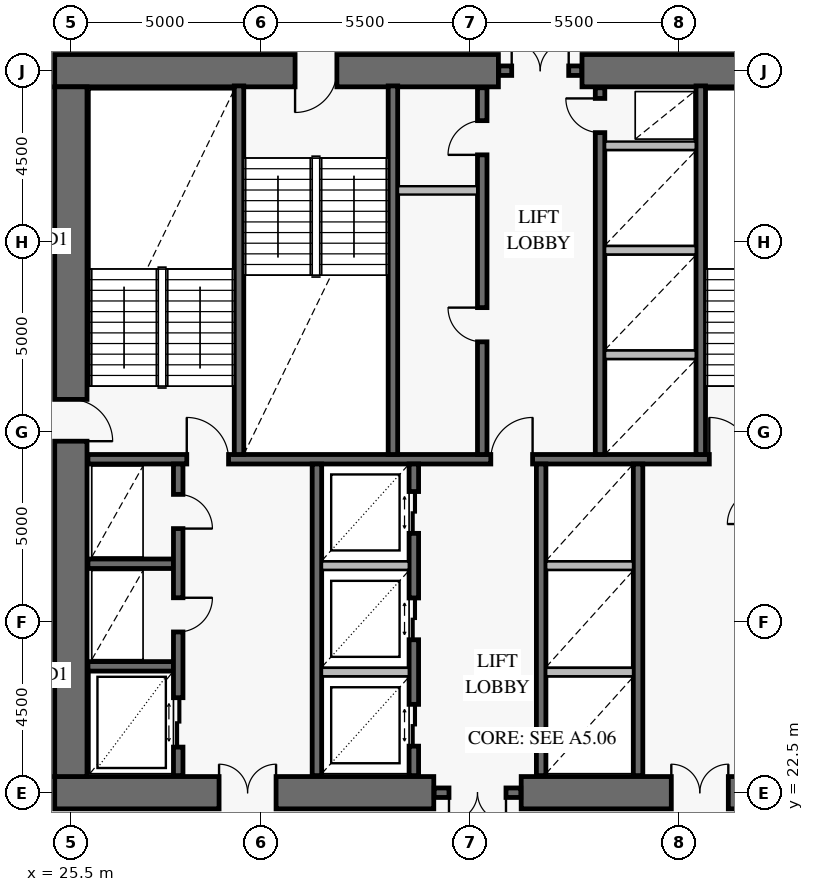
"""IFC4 building model, lengths in metres.
Left out: names, types, materials, properties, quantities, classifications, styles, units other than length and angle.
Written with IfcOpenShell. Run it as: python <this file> out.ifc"""

import sys

from ifc_helpers import new_model, si_unit, direction, frame, frame_2d, origin, place, context, subcontext, project, spatial, rectangle, extrude, element, fill, save


model = new_model("IFC4")
c1 = context("Model", 3, precision=1e-05, world=origin(), true_north=direction((0.0, 1.0)))
c2 = subcontext(c1, "Body", "Model", "MODEL_VIEW")
j1 = project(units=[si_unit("LENGTHUNIT", "METRE"), si_unit("PLANEANGLEUNIT", "RADIAN")], contexts=[c1])
p1 = place(None, origin())
s1 = spatial("IfcSite", under=j1, at=p1, CompositionType="ELEMENT")
p2 = place(p1, origin())
s2 = spatial("IfcBuilding", under=s1, at=p2, CompositionType="ELEMENT")
p3 = place(p2, frame((0.0, 0.0, 37.2)))
s3 = spatial("IfcBuildingStorey", under=s2, at=p3, CompositionType="ELEMENT", Elevation=37.2)
p4 = place(p3, frame((25.075, 22.5, 0.0), z_axis=(0.0, 0.0, 1.0), x_axis=(1.0, 0.0, 0.0)))
e1 = element("IfcWall", 1, at=p4, inside=s3, PredefinedType="SHEAR", context=c2, shape_type="SweptSolid", body=[
    extrude(rectangle(XDim=9.975, YDim=0.85, at=frame_2d((4.988, 0.0))), origin(), (0.0, 0.0, 1.0), 4.2),
])
p5 = place(p4, frame((4.325, 0.0, 0.0)))
e2 = element("IfcOpeningElement", 2, at=p5, cuts=e1, PredefinedType="OPENING", context=c2, shape_type="SweptSolid", body=[
    extrude(rectangle(XDim=1.5, YDim=2.15, at=frame_2d((0.75, 1.075))), frame((0.0, 0.437, 0.0), z_axis=(0.0, -1.0, 0.0), x_axis=(1.0, 0.0, 0.0)), (0.0, 0.0, 1.0), 0.874),
])
p6 = place(p3, frame((37.35, 22.5, 0.0), z_axis=(0.0, 0.0, 1.0), x_axis=(1.0, 0.0, 0.0)))
e3 = element("IfcWall", 3, at=p6, inside=s3, PredefinedType="SHEAR", context=c2, shape_type="SweptSolid", body=[
    extrude(rectangle(XDim=9.575, YDim=0.85, at=frame_2d((4.788, 0.0))), origin(), (0.0, 0.0, 1.0), 4.2),
])
p7 = place(p6, frame((3.95, 0.0, 0.0)))
e4 = element("IfcOpeningElement", 4, at=p7, cuts=e3, PredefinedType="OPENING", context=c2, shape_type="SweptSolid", body=[
    extrude(rectangle(XDim=1.5, YDim=2.15, at=frame_2d((0.75, 1.075))), frame((0.0, 0.437, 0.0), z_axis=(0.0, -1.0, 0.0), x_axis=(1.0, 0.0, 0.0)), (0.0, 0.0, 1.0), 0.874),
])
p8 = place(p3, frame((46.925, 41.5, 0.0), z_axis=(0.0, 0.0, 1.0), x_axis=(-1.0, 0.0, 0.0)))
e5 = element("IfcWall", 5, at=p8, inside=s3, PredefinedType="SHEAR", context=c2, shape_type="SweptSolid", body=[
    extrude(rectangle(XDim=7.975, YDim=0.85, at=frame_2d((3.988, 0.0))), origin(), (0.0, 0.0, 1.0), 4.2),
])
p9 = place(p3, frame((36.75, 41.5, 0.0), z_axis=(0.0, 0.0, 1.0), x_axis=(-1.0, 0.0, 0.0)))
e6 = element("IfcWall", 6, at=p9, inside=s3, PredefinedType="SHEAR", context=c2, shape_type="SweptSolid", body=[
    extrude(rectangle(XDim=11.675, YDim=0.85, at=frame_2d((5.837, 0.0))), origin(), (0.0, 0.0, 1.0), 4.2),
])
p10 = place(p9, frame((4.25, 0.0, 0.0)))
e7 = element("IfcOpeningElement", 7, at=p10, cuts=e6, PredefinedType="OPENING", context=c2, shape_type="SweptSolid", body=[
    extrude(rectangle(XDim=1.1, YDim=2.15, at=frame_2d((0.55, 1.075))), frame((0.0, 0.437, 0.0), z_axis=(0.0, -1.0, 0.0), x_axis=(1.0, 0.0, 0.0)), (0.0, 0.0, 1.0), 0.874),
])
p11 = place(p3, frame((25.5, 22.925, 0.0), z_axis=(0.0, 0.0, 1.0), x_axis=(0.0, 1.0, 0.0)))
e8 = element("IfcWall", 8, at=p11, inside=s3, PredefinedType="SHEAR", context=c2, shape_type="SweptSolid", body=[
    extrude(rectangle(XDim=18.15, YDim=0.85, at=frame_2d((9.075, 0.0))), origin(), (0.0, 0.0, 1.0), 4.2),
])
p12 = place(p11, frame((8.825, 0.0, 0.0)))
e9 = element("IfcOpeningElement", 9, at=p12, cuts=e8, PredefinedType="OPENING", context=c2, shape_type="SweptSolid", body=[
    extrude(rectangle(XDim=1.1, YDim=2.15, at=frame_2d((0.55, 1.075))), frame((0.0, 0.437, 0.0), z_axis=(0.0, -1.0, 0.0), x_axis=(1.0, 0.0, 0.0)), (0.0, 0.0, 1.0), 0.874),
])
p13 = place(p3, frame((35.06, 22.5, 0.0), z_axis=(0.0, 0.0, 1.0), x_axis=(1.0, 0.0, 0.0)))
e10 = element("IfcWall", 10, at=p13, inside=s3, PredefinedType="SOLIDWALL", context=c2, shape_type="SweptSolid", body=[
    extrude(rectangle(XDim=2.28, YDim=0.25, at=frame_2d((1.14, 0.0))), origin(), (0.0, 0.0, 1.0), 4.2),
])
p14 = place(p13, frame((0.39, 0.0, 0.0)))
e11 = element("IfcOpeningElement", 11, at=p14, cuts=e10, PredefinedType="OPENING", context=c2, shape_type="SweptSolid", body=[
    extrude(rectangle(XDim=1.5, YDim=2.15, at=frame_2d((0.75, 1.075))), frame((0.0, 0.137, 0.0), z_axis=(0.0, -1.0, 0.0), x_axis=(1.0, 0.0, 0.0)), (0.0, 0.0, 1.0), 0.274),
])
p15 = place(p3, frame((36.76, 41.5, 0.0), z_axis=(0.0, 0.0, 1.0), x_axis=(1.0, 0.0, 0.0)))
e12 = element("IfcWall", 12, at=p15, inside=s3, PredefinedType="SOLIDWALL", context=c2, shape_type="SweptSolid", body=[
    extrude(rectangle(XDim=2.18, YDim=0.25, at=frame_2d((1.09, 0.0))), origin(), (0.0, 0.0, 1.0), 4.2),
])
p16 = place(p15, frame((0.34, 0.0, 0.0)))
e13 = element("IfcOpeningElement", 13, at=p16, cuts=e12, PredefinedType="OPENING", context=c2, shape_type="SweptSolid", body=[
    extrude(rectangle(XDim=1.5, YDim=2.15, at=frame_2d((0.75, 1.075))), frame((0.0, 0.137, 0.0), z_axis=(0.0, -1.0, 0.0), x_axis=(1.0, 0.0, 0.0)), (0.0, 0.0, 1.0), 0.274),
])
p17 = place(p3, frame((25.95, 31.275, 0.0), z_axis=(0.0, 0.0, 1.0), x_axis=(1.0, 0.0, 0.0)))
e14 = element("IfcWall", 14, at=p17, inside=s3, PredefinedType="SOLIDWALL", context=c2, shape_type="SweptSolid", body=[
    extrude(rectangle(XDim=20.1, YDim=0.25, at=frame_2d((10.05, 0.0))), origin(), (0.0, 0.0, 1.0), 4.2),
])
p18 = place(p17, frame((2.6, 0.0, 0.0)))
e15 = element("IfcOpeningElement", 15, at=p18, cuts=e14, PredefinedType="OPENING", context=c2, shape_type="SweptSolid", body=[
    extrude(rectangle(XDim=1.1, YDim=2.15, at=frame_2d((0.55, 1.075))), frame((0.0, 0.137, 0.0), z_axis=(0.0, -1.0, 0.0), x_axis=(1.0, 0.0, 0.0)), (0.0, 0.0, 1.0), 0.274),
])
p19 = place(p17, frame((10.6, 0.0, 0.0)))
e16 = element("IfcOpeningElement", 16, at=p19, cuts=e14, PredefinedType="OPENING", context=c2, shape_type="SweptSolid", body=[
    extrude(rectangle(XDim=1.1, YDim=2.15, at=frame_2d((0.55, 1.075))), frame((0.0, 0.137, 0.0), z_axis=(0.0, -1.0, 0.0), x_axis=(1.0, 0.0, 0.0)), (0.0, 0.0, 1.0), 0.274),
])
p20 = place(p17, frame((16.35, 0.0, 0.0)))
e17 = element("IfcOpeningElement", 17, at=p20, cuts=e14, PredefinedType="OPENING", context=c2, shape_type="SweptSolid", body=[
    extrude(rectangle(XDim=1.1, YDim=2.15, at=frame_2d((0.55, 1.075))), frame((0.0, 0.137, 0.0), z_axis=(0.0, -1.0, 0.0), x_axis=(1.0, 0.0, 0.0)), (0.0, 0.0, 1.0), 0.274),
])
for number, where, z_axis, x_axis in (
    (18, (29.925, 31.4, 0.0), (0.0, 0.0, 1.0), (0.0, 1.0, 0.0)),
    (19, (33.975, 31.4, 0.0), (0.0, 0.0, 1.0), (0.0, 1.0, 0.0)),
    (20, (42.075, 31.4, 0.0), (0.0, 0.0, 1.0), (0.0, 1.0, 0.0)),
):
    element("IfcWall", number, at=place(p3, frame(where, z_axis=z_axis, x_axis=x_axis)), inside=s3, PredefinedType="SOLIDWALL", context=c2, shape_type="SweptSolid", body=[
        extrude(rectangle(XDim=9.7, YDim=0.25, at=frame_2d((4.85, 0.0))), origin(), (0.0, 0.0, 1.0), 4.2),
    ])
p21 = place(p3, frame((36.325, 31.4, 0.0), z_axis=(0.0, 0.0, 1.0), x_axis=(0.0, 1.0, 0.0)))
e21 = element("IfcWall", 21, at=p21, inside=s3, PredefinedType="SOLIDWALL", context=c2, shape_type="SweptSolid", body=[
    extrude(rectangle(XDim=9.65, YDim=0.25, at=frame_2d((4.825, 0.0))), origin(), (0.0, 0.0, 1.0), 4.2),
])
p22 = place(p21, frame((2.965, 0.0, 0.0)))
e22 = element("IfcOpeningElement", 22, at=p22, cuts=e21, PredefinedType="OPENING", context=c2, shape_type="SweptSolid", body=[
    extrude(rectangle(XDim=0.9, YDim=2.1, at=frame_2d((0.45, 1.05))), frame((0.0, 0.137, 0.0), z_axis=(0.0, -1.0, 0.0), x_axis=(1.0, 0.0, 0.0)), (0.0, 0.0, 1.0), 0.274),
])
p23 = place(p21, frame((7.885, 0.0, 0.0)))
e23 = element("IfcOpeningElement", 23, at=p23, cuts=e21, PredefinedType="OPENING", context=c2, shape_type="SweptSolid", body=[
    extrude(rectangle(XDim=0.9, YDim=2.1, at=frame_2d((0.45, 1.05))), frame((0.0, 0.137, 0.0), z_axis=(0.0, -1.0, 0.0), x_axis=(1.0, 0.0, 0.0)), (0.0, 0.0, 1.0), 0.274),
])
p24 = place(p3, frame((39.425, 31.4, 0.0), z_axis=(0.0, 0.0, 1.0), x_axis=(0.0, 1.0, 0.0)))
e24 = element("IfcWall", 24, at=p24, inside=s3, PredefinedType="SOLIDWALL", context=c2, shape_type="SweptSolid", body=[
    extrude(rectangle(XDim=9.65, YDim=0.25, at=frame_2d((4.825, 0.0))), origin(), (0.0, 0.0, 1.0), 4.2),
])
p25 = place(p24, frame((8.47, 0.0, 0.0)))
e25 = element("IfcOpeningElement", 25, at=p25, cuts=e24, PredefinedType="OPENING", context=c2, shape_type="SweptSolid", body=[
    extrude(rectangle(XDim=0.9, YDim=2.1, at=frame_2d((0.45, 1.05))), frame((0.0, 0.137, 0.0), z_axis=(0.0, -1.0, 0.0), x_axis=(1.0, 0.0, 0.0)), (0.0, 0.0, 1.0), 0.274),
])
for number, where, z_axis, x_axis in (
    (26, (25.95, 25.825, 0.0), (0.0, 0.0, 1.0), (1.0, 0.0, 0.0)),
    (27, (25.95, 28.525, 0.0), (0.0, 0.0, 1.0), (1.0, 0.0, 0.0)),
):
    element("IfcWall", number, at=place(p3, frame(where, z_axis=z_axis, x_axis=x_axis)), inside=s3, PredefinedType="SOLIDWALL", context=c2, shape_type="SweptSolid", body=[
        extrude(rectangle(XDim=2.25, YDim=0.25, at=frame_2d((1.125, 0.0))), origin(), (0.0, 0.0, 1.0), 4.2),
    ])
p26 = place(p3, frame((28.325, 22.95, 0.0), z_axis=(0.0, 0.0, 1.0), x_axis=(0.0, 1.0, 0.0)))
e28 = element("IfcWall", 28, at=p26, inside=s3, PredefinedType="SOLIDWALL", context=c2, shape_type="SweptSolid", body=[
    extrude(rectangle(XDim=8.2, YDim=0.25, at=frame_2d((4.1, 0.0))), origin(), (0.0, 0.0, 1.0), 4.2),
])
p27 = place(p26, frame((0.75, 0.0, 0.0)))
e29 = element("IfcOpeningElement", 29, at=p27, cuts=e28, PredefinedType="OPENING", context=c2, shape_type="SweptSolid", body=[
    extrude(rectangle(XDim=1.3, YDim=2.3, at=frame_2d((0.65, 1.15))), frame((0.0, 0.137, 0.0), z_axis=(0.0, -1.0, 0.0), x_axis=(1.0, 0.0, 0.0)), (0.0, 0.0, 1.0), 0.274),
])
p28 = place(p26, frame((3.78, 0.0, 0.0)))
e30 = element("IfcOpeningElement", 30, at=p28, cuts=e28, PredefinedType="OPENING", context=c2, shape_type="SweptSolid", body=[
    extrude(rectangle(XDim=0.9, YDim=2.1, at=frame_2d((0.45, 1.05))), frame((0.0, 0.137, 0.0), z_axis=(0.0, -1.0, 0.0), x_axis=(1.0, 0.0, 0.0)), (0.0, 0.0, 1.0), 0.274),
])
p29 = place(p26, frame((6.5, 0.0, 0.0)))
e31 = element("IfcOpeningElement", 31, at=p29, cuts=e28, PredefinedType="OPENING", context=c2, shape_type="SweptSolid", body=[
    extrude(rectangle(XDim=0.9, YDim=2.1, at=frame_2d((0.45, 1.05))), frame((0.0, 0.137, 0.0), z_axis=(0.0, -1.0, 0.0), x_axis=(1.0, 0.0, 0.0)), (0.0, 0.0, 1.0), 0.274),
])
p30 = place(p3, frame((31.975, 22.95, 0.0), z_axis=(0.0, 0.0, 1.0), x_axis=(0.0, 1.0, 0.0)))
e32 = element("IfcWall", 32, at=p30, inside=s3, PredefinedType="SOLIDWALL", context=c2, shape_type="SweptSolid", body=[
    extrude(rectangle(XDim=8.2, YDim=0.25, at=frame_2d((4.1, 0.0))), origin(), (0.0, 0.0, 1.0), 4.2),
])
p31 = place(p3, frame((34.525, 22.95, 0.0), z_axis=(0.0, 0.0, 1.0), x_axis=(0.0, 1.0, 0.0)))
e33 = element("IfcWall", 33, at=p31, inside=s3, PredefinedType="SOLIDWALL", context=c2, shape_type="SweptSolid", body=[
    extrude(rectangle(XDim=8.2, YDim=0.25, at=frame_2d((4.1, 0.0))), origin(), (0.0, 0.0, 1.0), 4.2),
])
p32 = place(p31, frame((0.775, 0.0, 0.0)))
e34 = element("IfcOpeningElement", 34, at=p32, cuts=e33, PredefinedType="OPENING", context=c2, shape_type="SweptSolid", body=[
    extrude(rectangle(XDim=1.1, YDim=2.2, at=frame_2d((0.55, 1.1))), frame((0.0, 0.137, 0.0), z_axis=(0.0, -1.0, 0.0), x_axis=(1.0, 0.0, 0.0)), (0.0, 0.0, 1.0), 0.274),
])
p33 = place(p31, frame((3.575, 0.0, 0.0)))
e35 = element("IfcOpeningElement", 35, at=p33, cuts=e33, PredefinedType="OPENING", context=c2, shape_type="SweptSolid", body=[
    extrude(rectangle(XDim=1.1, YDim=2.2, at=frame_2d((0.55, 1.1))), frame((0.0, 0.137, 0.0), z_axis=(0.0, -1.0, 0.0), x_axis=(1.0, 0.0, 0.0)), (0.0, 0.0, 1.0), 0.274),
])
p34 = place(p31, frame((6.375, 0.0, 0.0)))
e36 = element("IfcOpeningElement", 36, at=p34, cuts=e33, PredefinedType="OPENING", context=c2, shape_type="SweptSolid", body=[
    extrude(rectangle(XDim=1.1, YDim=2.2, at=frame_2d((0.55, 1.1))), frame((0.0, 0.137, 0.0), z_axis=(0.0, -1.0, 0.0), x_axis=(1.0, 0.0, 0.0)), (0.0, 0.0, 1.0), 0.274),
])
for number, where, z_axis, x_axis in (
    (37, (37.875, 22.95, 0.0), (0.0, 0.0, 1.0), (0.0, 1.0, 0.0)),
    (38, (40.425, 22.95, 0.0), (0.0, 0.0, 1.0), (0.0, 1.0, 0.0)),
):
    element("IfcWall", number, at=place(p3, frame(where, z_axis=z_axis, x_axis=x_axis)), inside=s3, PredefinedType="SOLIDWALL", context=c2, shape_type="SweptSolid", body=[
        extrude(rectangle(XDim=8.2, YDim=0.25, at=frame_2d((4.1, 0.0))), origin(), (0.0, 0.0, 1.0), 4.2),
    ])
p35 = place(p3, frame((34.108, 38.35, 0.0), z_axis=(0.0, 0.0, 1.0), x_axis=(1.0, 0.0, 0.0)))
e39 = element("IfcWall", 39, at=p35, inside=s3, PredefinedType="PARTITIONING", context=c2, shape_type="SweptSolid", body=[
    extrude(rectangle(XDim=2.084, YDim=0.22, at=frame_2d((1.042, 0.0))), origin(), (0.0, 0.0, 1.0), 3.92),
])
for number, where, z_axis, x_axis in (
    (40, (39.558, 34.025, 0.0), (0.0, 0.0, 1.0), (1.0, 0.0, 0.0)),
    (41, (39.558, 36.775, 0.0), (0.0, 0.0, 1.0), (1.0, 0.0, 0.0)),
    (42, (39.558, 39.525, 0.0), (0.0, 0.0, 1.0), (1.0, 0.0, 0.0)),
):
    element("IfcWall", number, at=place(p3, frame(where, z_axis=z_axis, x_axis=x_axis)), inside=s3, PredefinedType="PARTITIONING", context=c2, shape_type="SweptSolid", body=[
        extrude(rectangle(XDim=2.384, YDim=0.22, at=frame_2d((1.192, 0.0))), origin(), (0.0, 0.0, 1.0), 3.92),
    ])
for number, where, z_axis, x_axis in (
    (43, (32.108, 25.675, 0.0), (0.0, 0.0, 1.0), (1.0, 0.0, 0.0)),
    (44, (32.108, 28.475, 0.0), (0.0, 0.0, 1.0), (1.0, 0.0, 0.0)),
):
    element("IfcWall", number, at=place(p3, frame(where, z_axis=z_axis, x_axis=x_axis)), inside=s3, PredefinedType="PARTITIONING", context=c2, shape_type="SweptSolid", body=[
        extrude(rectangle(XDim=2.284, YDim=0.22, at=frame_2d((1.142, 0.0))), origin(), (0.0, 0.0, 1.0), 3.92),
    ])
for number, where, z_axis, x_axis in (
    (45, (38.008, 25.675, 0.0), (0.0, 0.0, 1.0), (1.0, 0.0, 0.0)),
    (46, (38.008, 28.475, 0.0), (0.0, 0.0, 1.0), (1.0, 0.0, 0.0)),
):
    element("IfcWall", number, at=place(p3, frame(where, z_axis=z_axis, x_axis=x_axis)), inside=s3, PredefinedType="PARTITIONING", context=c2, shape_type="SweptSolid", body=[
        extrude(rectangle(XDim=2.284, YDim=0.22, at=frame_2d((1.142, 0.0))), origin(), (0.0, 0.0, 1.0), 3.92),
    ])
p36 = place(p12, frame((1.1, 0.0, 0.0), z_axis=(0.0, 0.0, 1.0), x_axis=(-1.0, 0.0, 0.0)))
e47 = element("IfcDoor", 47, at=p36, inside=s3, OperationType="SINGLE_SWING_RIGHT", PredefinedType="USERDEFINED", context=c2, shape_type="SweptSolid", body=[
    extrude(rectangle(XDim=1.1, YDim=2.15, at=frame_2d((0.55, 1.075))), frame((0.0, 0.025, 0.0), z_axis=(0.0, -1.0, 0.0), x_axis=(1.0, 0.0, 0.0)), (0.0, 0.0, 1.0), 0.05),
])
fill(e9, e47)
p37 = place(p10, origin())
e48 = element("IfcDoor", 48, at=p37, inside=s3, OperationType="SINGLE_SWING_RIGHT", PredefinedType="USERDEFINED", context=c2, shape_type="SweptSolid", body=[
    extrude(rectangle(XDim=1.1, YDim=2.15, at=frame_2d((0.55, 1.075))), frame((0.0, 0.025, 0.0), z_axis=(0.0, -1.0, 0.0), x_axis=(1.0, 0.0, 0.0)), (0.0, 0.0, 1.0), 0.05),
])
fill(e7, e48)
p38 = place(p5, origin())
e49 = element("IfcDoor", 49, at=p38, inside=s3, OperationType="DOUBLE_DOOR_SINGLE_SWING", PredefinedType="DOOR", context=c2, shape_type="SweptSolid", body=[
    extrude(rectangle(XDim=1.5, YDim=2.15, at=frame_2d((0.75, 1.075))), frame((0.0, 0.025, 0.0), z_axis=(0.0, -1.0, 0.0), x_axis=(1.0, 0.0, 0.0)), (0.0, 0.0, 1.0), 0.05),
])
fill(e2, e49)
p39 = place(p7, origin())
e50 = element("IfcDoor", 50, at=p39, inside=s3, OperationType="DOUBLE_DOOR_SINGLE_SWING", PredefinedType="DOOR", context=c2, shape_type="SweptSolid", body=[
    extrude(rectangle(XDim=1.5, YDim=2.15, at=frame_2d((0.75, 1.075))), frame((0.0, 0.025, 0.0), z_axis=(0.0, -1.0, 0.0), x_axis=(1.0, 0.0, 0.0)), (0.0, 0.0, 1.0), 0.05),
])
fill(e4, e50)
p40 = place(p14, frame((1.5, 0.0, 0.0), z_axis=(0.0, 0.0, 1.0), x_axis=(-1.0, 0.0, 0.0)))
e51 = element("IfcDoor", 51, at=p40, inside=s3, OperationType="DOUBLE_DOOR_SINGLE_SWING", PredefinedType="DOOR", context=c2, shape_type="SweptSolid", body=[
    extrude(rectangle(XDim=1.5, YDim=2.15, at=frame_2d((0.75, 1.075))), frame((0.0, 0.025, 0.0), z_axis=(0.0, -1.0, 0.0), x_axis=(1.0, 0.0, 0.0)), (0.0, 0.0, 1.0), 0.05),
])
fill(e11, e51)
p41 = place(p16, origin())
e52 = element("IfcDoor", 52, at=p41, inside=s3, OperationType="DOUBLE_DOOR_SINGLE_SWING", PredefinedType="DOOR", context=c2, shape_type="SweptSolid", body=[
    extrude(rectangle(XDim=1.5, YDim=2.15, at=frame_2d((0.75, 1.075))), frame((0.0, 0.025, 0.0), z_axis=(0.0, -1.0, 0.0), x_axis=(1.0, 0.0, 0.0)), (0.0, 0.0, 1.0), 0.05),
])
fill(e13, e52)
p42 = place(p18, origin())
e53 = element("IfcDoor", 53, at=p42, inside=s3, OperationType="SINGLE_SWING_LEFT", PredefinedType="USERDEFINED", context=c2, shape_type="SweptSolid", body=[
    extrude(rectangle(XDim=1.1, YDim=2.15, at=frame_2d((0.55, 1.075))), frame((0.0, 0.025, 0.0), z_axis=(0.0, -1.0, 0.0), x_axis=(1.0, 0.0, 0.0)), (0.0, 0.0, 1.0), 0.05),
])
fill(e15, e53)
p43 = place(p19, origin())
e54 = element("IfcDoor", 54, at=p43, inside=s3, OperationType="SINGLE_SWING_RIGHT", PredefinedType="USERDEFINED", context=c2, shape_type="SweptSolid", body=[
    extrude(rectangle(XDim=1.1, YDim=2.15, at=frame_2d((0.55, 1.075))), frame((0.0, 0.025, 0.0), z_axis=(0.0, -1.0, 0.0), x_axis=(1.0, 0.0, 0.0)), (0.0, 0.0, 1.0), 0.05),
])
fill(e16, e54)
p44 = place(p20, origin())
e55 = element("IfcDoor", 55, at=p44, inside=s3, OperationType="SINGLE_SWING_LEFT", PredefinedType="USERDEFINED", context=c2, shape_type="SweptSolid", body=[
    extrude(rectangle(XDim=1.1, YDim=2.15, at=frame_2d((0.55, 1.075))), frame((0.0, 0.025, 0.0), z_axis=(0.0, -1.0, 0.0), x_axis=(1.0, 0.0, 0.0)), (0.0, 0.0, 1.0), 0.05),
])
fill(e17, e55)
p45 = place(p22, origin())
e56 = element("IfcDoor", 56, at=p45, inside=s3, OperationType="SINGLE_SWING_RIGHT", PredefinedType="DOOR", context=c2, shape_type="SweptSolid", body=[
    extrude(rectangle(XDim=0.9, YDim=2.1, at=frame_2d((0.45, 1.05))), frame((0.0, 0.025, 0.0), z_axis=(0.0, -1.0, 0.0), x_axis=(1.0, 0.0, 0.0)), (0.0, 0.0, 1.0), 0.05),
])
fill(e22, e56)
p46 = place(p23, origin())
e57 = element("IfcDoor", 57, at=p46, inside=s3, OperationType="SINGLE_SWING_LEFT", PredefinedType="DOOR", context=c2, shape_type="SweptSolid", body=[
    extrude(rectangle(XDim=0.9, YDim=2.1, at=frame_2d((0.45, 1.05))), frame((0.0, 0.025, 0.0), z_axis=(0.0, -1.0, 0.0), x_axis=(1.0, 0.0, 0.0)), (0.0, 0.0, 1.0), 0.05),
])
fill(e23, e57)
p47 = place(p25, origin())
e58 = element("IfcDoor", 58, at=p47, inside=s3, OperationType="SINGLE_SWING_RIGHT", PredefinedType="DOOR", context=c2, shape_type="SweptSolid", body=[
    extrude(rectangle(XDim=0.9, YDim=2.1, at=frame_2d((0.45, 1.05))), frame((0.0, 0.025, 0.0), z_axis=(0.0, -1.0, 0.0), x_axis=(1.0, 0.0, 0.0)), (0.0, 0.0, 1.0), 0.05),
])
fill(e25, e58)
p48 = place(p27, frame((1.3, 0.0, 0.0), z_axis=(0.0, 0.0, 1.0), x_axis=(-1.0, 0.0, 0.0)))
e59 = element("IfcDoor", 59, at=p48, inside=s3, OperationType="DOUBLE_DOOR_SLIDING", PredefinedType="DOOR", context=c2, shape_type="SweptSolid", body=[
    extrude(rectangle(XDim=1.3, YDim=2.3, at=frame_2d((0.65, 1.15))), frame((0.0, 0.025, 0.0), z_axis=(0.0, -1.0, 0.0), x_axis=(1.0, 0.0, 0.0)), (0.0, 0.0, 1.0), 0.05),
])
fill(e29, e59)
p49 = place(p28, frame((0.9, 0.0, 0.0), z_axis=(0.0, 0.0, 1.0), x_axis=(-1.0, 0.0, 0.0)))
e60 = element("IfcDoor", 60, at=p49, inside=s3, OperationType="SINGLE_SWING_LEFT", PredefinedType="DOOR", context=c2, shape_type="SweptSolid", body=[
    extrude(rectangle(XDim=0.9, YDim=2.1, at=frame_2d((0.45, 1.05))), frame((0.0, 0.025, 0.0), z_axis=(0.0, -1.0, 0.0), x_axis=(1.0, 0.0, 0.0)), (0.0, 0.0, 1.0), 0.05),
])
fill(e30, e60)
p50 = place(p29, frame((0.9, 0.0, 0.0), z_axis=(0.0, 0.0, 1.0), x_axis=(-1.0, 0.0, 0.0)))
e61 = element("IfcDoor", 61, at=p50, inside=s3, OperationType="SINGLE_SWING_RIGHT", PredefinedType="DOOR", context=c2, shape_type="SweptSolid", body=[
    extrude(rectangle(XDim=0.9, YDim=2.1, at=frame_2d((0.45, 1.05))), frame((0.0, 0.025, 0.0), z_axis=(0.0, -1.0, 0.0), x_axis=(1.0, 0.0, 0.0)), (0.0, 0.0, 1.0), 0.05),
])
fill(e31, e61)
p51 = place(p32, frame((1.1, 0.0, 0.0), z_axis=(0.0, 0.0, 1.0), x_axis=(-1.0, 0.0, 0.0)))
e62 = element("IfcDoor", 62, at=p51, inside=s3, OperationType="DOUBLE_DOOR_SLIDING", PredefinedType="DOOR", context=c2, shape_type="SweptSolid", body=[
    extrude(rectangle(XDim=1.1, YDim=2.2, at=frame_2d((0.55, 1.1))), frame((0.0, 0.025, 0.0), z_axis=(0.0, -1.0, 0.0), x_axis=(1.0, 0.0, 0.0)), (0.0, 0.0, 1.0), 0.05),
])
fill(e34, e62)
p52 = place(p33, frame((1.1, 0.0, 0.0), z_axis=(0.0, 0.0, 1.0), x_axis=(-1.0, 0.0, 0.0)))
e63 = element("IfcDoor", 63, at=p52, inside=s3, OperationType="DOUBLE_DOOR_SLIDING", PredefinedType="DOOR", context=c2, shape_type="SweptSolid", body=[
    extrude(rectangle(XDim=1.1, YDim=2.2, at=frame_2d((0.55, 1.1))), frame((0.0, 0.025, 0.0), z_axis=(0.0, -1.0, 0.0), x_axis=(1.0, 0.0, 0.0)), (0.0, 0.0, 1.0), 0.05),
])
fill(e35, e63)
p53 = place(p34, frame((1.1, 0.0, 0.0), z_axis=(0.0, 0.0, 1.0), x_axis=(-1.0, 0.0, 0.0)))
e64 = element("IfcDoor", 64, at=p53, inside=s3, OperationType="DOUBLE_DOOR_SLIDING", PredefinedType="DOOR", context=c2, shape_type="SweptSolid", body=[
    extrude(rectangle(XDim=1.1, YDim=2.2, at=frame_2d((0.55, 1.1))), frame((0.0, 0.025, 0.0), z_axis=(0.0, -1.0, 0.0), x_axis=(1.0, 0.0, 0.0)), (0.0, 0.0, 1.0), 0.05),
])
fill(e36, e64)
save(model, sys.argv[1])
